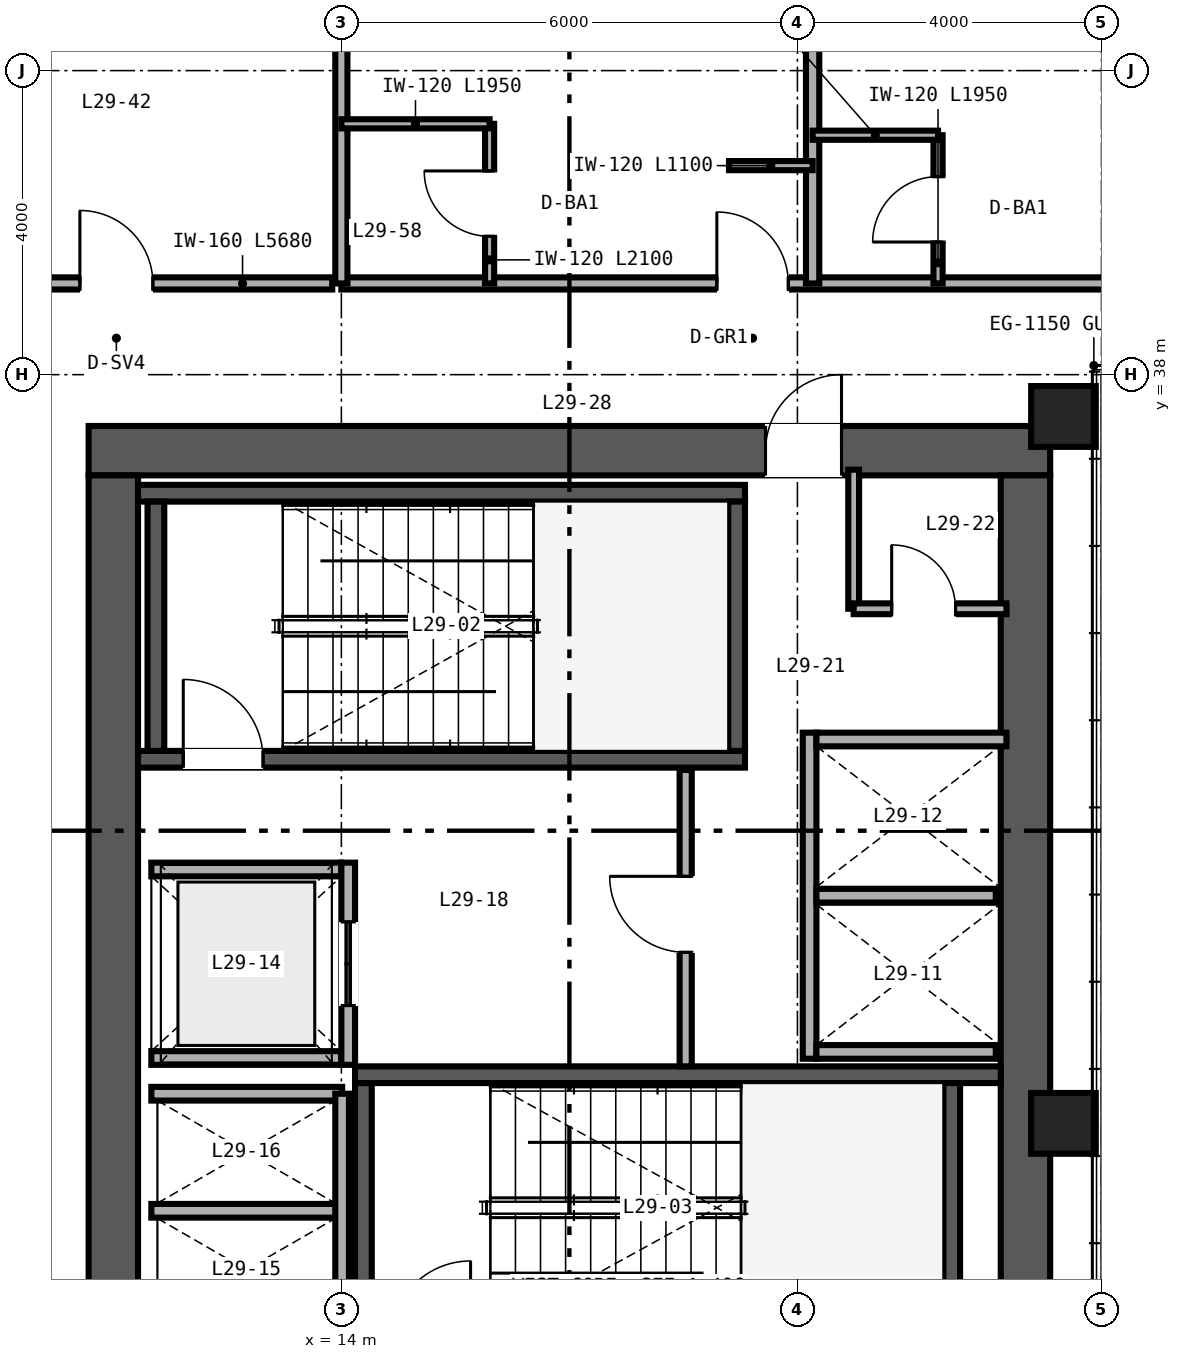
"""IFC4 building model, lengths in metres.
Left out: names, types, materials, properties, quantities, classifications, styles, units other than length and angle.
Written with IfcOpenShell. Run it as: python <this file> out.ifc"""

import sys

from ifc_helpers import new_model, si_unit, direction, frame, frame_2d, origin, origin_2d, place, context, subcontext, project, spatial, rectangle, hollow_rectangle, extrude, source, transform, mapped, element, fill, save


model = new_model("IFC4")
c1 = context("Model", 3, precision=1e-05, world=origin(), true_north=direction((0.0, 1.0)))
c2 = subcontext(c1, "Body", "Model", "MODEL_VIEW")
j1 = project(units=[si_unit("LENGTHUNIT", "METRE"), si_unit("PLANEANGLEUNIT", "RADIAN")], contexts=[c1])
p1 = place(None, origin())
s1 = spatial("IfcSite", under=j1, at=p1, CompositionType="ELEMENT")
p2 = place(p1, origin())
s2 = spatial("IfcBuilding", under=s1, at=p2, CompositionType="ELEMENT")
p3 = place(p2, frame((0.0, 0.0, 118.8)))
s3 = spatial("IfcBuildingStorey", under=s2, at=p3, CompositionType="ELEMENT", Elevation=118.8)
p4 = place(p3, frame((10.675, 37.0, 0.0), z_axis=(0.0, 0.0, 1.0), x_axis=(1.0, 0.0, 0.0)))
e1 = element("IfcWall", 1, at=p4, inside=s3, PredefinedType="SHEAR", context=c2, shape_type="SweptSolid", body=[
    extrude(rectangle(XDim=12.65, YDim=0.65, at=frame_2d((6.325, 0.0))), origin(), (0.0, 0.0, 1.0), 3.36),
])
p5 = place(p4, frame((8.905, 0.0, 0.0)))
e2 = element("IfcOpeningElement", 2, at=p5, cuts=e1, PredefinedType="OPENING", context=c2, shape_type="SweptSolid", body=[
    extrude(rectangle(XDim=1.0, YDim=2.15, at=frame_2d((0.5, 1.075))), frame((0.0, 0.335, 0.0), z_axis=(0.0, -1.0, 0.0), x_axis=(1.0, 0.0, 0.0)), (0.0, 0.0, 1.0), 0.67),
])
for number, where, z_axis, x_axis in (
    (3, (11.0, 15.325, 0.0), (0.0, 0.0, 1.0), (0.0, 1.0, 0.0)),
    (4, (23.0, 15.325, 0.0), (0.0, 0.0, 1.0), (0.0, 1.0, 0.0)),
):
    element("IfcWall", number, at=place(p3, frame(where, z_axis=z_axis, x_axis=x_axis)), inside=s3, PredefinedType="SHEAR", context=c2, shape_type="SweptSolid", body=[
        extrude(rectangle(XDim=21.35, YDim=0.65, at=frame_2d((10.675, 0.0))), origin(), (0.0, 0.0, 1.0), 3.36),
    ])
p6 = place(p3, frame((11.325, 32.94, 0.0), z_axis=(0.0, 0.0, 1.0), x_axis=(1.0, 0.0, 0.0)))
e5 = element("IfcWall", 5, at=p6, inside=s3, PredefinedType="SHEAR", context=c2, shape_type="SweptSolid", body=[
    extrude(rectangle(XDim=7.985, YDim=0.22, at=frame_2d((3.993, 0.0))), origin(), (0.0, 0.0, 1.0), 3.4),
])
p7 = place(p6, frame((0.595, 0.0, 0.0)))
e6 = element("IfcOpeningElement", 6, at=p7, cuts=e5, PredefinedType="OPENING", context=c2, shape_type="SweptSolid", body=[
    extrude(rectangle(XDim=1.05, YDim=2.15, at=frame_2d((0.525, 1.075))), frame((0.0, 0.12, 0.0), z_axis=(0.0, -1.0, 0.0), x_axis=(1.0, 0.0, 0.0)), (0.0, 0.0, 1.0), 0.24),
])
p8 = place(p3, frame((11.325, 36.44, 0.0), z_axis=(0.0, 0.0, 1.0), x_axis=(1.0, 0.0, 0.0)))
e7 = element("IfcWall", 7, at=p8, inside=s3, PredefinedType="SHEAR", context=c2, shape_type="SweptSolid", body=[
    extrude(rectangle(XDim=7.985, YDim=0.22, at=frame_2d((3.993, 0.0))), origin(), (0.0, 0.0, 1.0), 3.4),
])
for number, where, z_axis, x_axis in (
    (8, (11.56, 33.05, 0.0), (0.0, 0.0, 1.0), (0.0, 1.0, 0.0)),
    (9, (19.2, 33.05, 0.0), (0.0, 0.0, 1.0), (0.0, 1.0, 0.0)),
):
    element("IfcWall", number, at=place(p3, frame(where, z_axis=z_axis, x_axis=x_axis)), inside=s3, PredefinedType="SHEAR", context=c2, shape_type="SweptSolid", body=[
        extrude(rectangle(XDim=3.28, YDim=0.22, at=frame_2d((1.64, 0.0))), origin(), (0.0, 0.0, 1.0), 3.4),
    ])
p9 = place(p3, frame((14.18, 28.79, 0.0), z_axis=(0.0, 0.0, 1.0), x_axis=(1.0, 0.0, 0.0)))
e10 = element("IfcWall", 10, at=p9, inside=s3, PredefinedType="SHEAR", context=c2, shape_type="SweptSolid", body=[
    extrude(rectangle(XDim=8.495, YDim=0.22, at=frame_2d((4.248, 0.0))), origin(), (0.0, 0.0, 1.0), 3.4),
])
for number, where, z_axis, x_axis in (
    (11, (14.29, 25.4, 0.0), (0.0, 0.0, 1.0), (0.0, 1.0, 0.0)),
    (12, (22.03, 25.4, 0.0), (0.0, 0.0, 1.0), (0.0, 1.0, 0.0)),
):
    element("IfcWall", number, at=place(p3, frame(where, z_axis=z_axis, x_axis=x_axis)), inside=s3, PredefinedType="SHEAR", context=c2, shape_type="SweptSolid", body=[
        extrude(rectangle(XDim=3.28, YDim=0.22, at=frame_2d((1.64, 0.0))), origin(), (0.0, 0.0, 1.0), 3.4),
    ])
m1 = source(origin(), c2, "Body", "SweptSolid", [
    extrude(hollow_rectangle(XDim=0.85, YDim=0.8, WallThickness=0.032, at=origin_2d()), origin(), (0.0, 0.0, 1.0), 3.36),
])
for number, where, z_axis, x_axis in (
    (13, (23.5, 28.15, 0.0), (0.0, 0.0, 1.0), (1.0, 0.0, 0.0)),
    (14, (23.5, 37.45, 0.0), (0.0, 0.0, 1.0), (1.0, 0.0, 0.0)),
):
    element("IfcColumn", number, at=place(p3, frame(where, z_axis=z_axis, x_axis=x_axis)), inside=s3, PredefinedType="COLUMN", context=c2, shape_type="MappedRepresentation", body=[
        mapped(m1, transform((0.0, 0.0, 0.0), scale=1.0)),
    ])
p10 = place(p3, frame((20.16, 29.0, 0.0), z_axis=(0.0, 0.0, 1.0), x_axis=(0.0, 1.0, 0.0)))
e15 = element("IfcWall", 15, at=p10, inside=s3, PredefinedType="SOLIDWALL", context=c2, shape_type="SweptSolid", body=[
    extrude(rectangle(XDim=4.29, YDim=0.18, at=frame_2d((2.145, 0.0))), origin(), (0.0, 0.0, 1.0), 3.36),
])
p11 = place(p3, frame((20.25, 29.09, 0.0), z_axis=(0.0, 0.0, 1.0), x_axis=(1.0, 0.0, 0.0)))
e16 = element("IfcWall", 16, at=p11, inside=s3, PredefinedType="SOLIDWALL", context=c2, shape_type="SweptSolid", body=[
    extrude(rectangle(XDim=2.36, YDim=0.18, at=frame_2d((1.18, 0.0))), origin(), (0.0, 0.0, 1.0), 3.36),
])
p12 = place(p3, frame((20.25, 33.2, 0.0), z_axis=(0.0, 0.0, 1.0), x_axis=(1.0, 0.0, 0.0)))
e17 = element("IfcWall", 17, at=p12, inside=s3, PredefinedType="SOLIDWALL", context=c2, shape_type="SweptSolid", body=[
    extrude(rectangle(XDim=2.5, YDim=0.18, at=frame_2d((1.25, 0.0))), origin(), (0.0, 0.0, 1.0), 3.36),
])
p13 = place(p3, frame((20.25, 31.145, 0.0), z_axis=(0.0, 0.0, 1.0), x_axis=(1.0, 0.0, 0.0)))
e18 = element("IfcWall", 18, at=p13, inside=s3, PredefinedType="SOLIDWALL", context=c2, shape_type="SweptSolid", body=[
    extrude(rectangle(XDim=2.36, YDim=0.18, at=frame_2d((1.18, 0.0))), origin(), (0.0, 0.0, 1.0), 3.36),
])
for number, where, z_axis, x_axis in (
    (19, (11.5, 29.01, 0.0), (0.0, 0.0, 1.0), (1.0, 0.0, 0.0)),
    (20, (11.5, 31.49, 0.0), (0.0, 0.0, 1.0), (1.0, 0.0, 0.0)),
):
    element("IfcWall", number, at=place(p3, frame(where, z_axis=z_axis, x_axis=x_axis)), inside=s3, PredefinedType="SOLIDWALL", context=c2, shape_type="SweptSolid", body=[
        extrude(rectangle(XDim=2.5, YDim=0.18, at=frame_2d((1.25, 0.0))), origin(), (0.0, 0.0, 1.0), 3.36),
    ])
p14 = place(p3, frame((14.09, 28.92, 0.0), z_axis=(0.0, 0.0, 1.0), x_axis=(0.0, 1.0, 0.0)))
e21 = element("IfcWall", 21, at=p14, inside=s3, PredefinedType="SOLIDWALL", context=c2, shape_type="SweptSolid", body=[
    extrude(rectangle(XDim=2.66, YDim=0.18, at=frame_2d((1.33, 0.0))), origin(), (0.0, 0.0, 1.0), 3.36),
])
p15 = place(p14, frame((0.78, 0.0, 0.0)))
e22 = element("IfcOpeningElement", 22, at=p15, cuts=e21, PredefinedType="OPENING", context=c2, shape_type="SweptSolid", body=[
    extrude(rectangle(XDim=1.1, YDim=2.2, at=frame_2d((0.55, 1.1))), frame((0.0, 0.1, 0.0), z_axis=(0.0, -1.0, 0.0), x_axis=(1.0, 0.0, 0.0)), (0.0, 0.0, 1.0), 0.2),
])
for number, where, z_axis, x_axis in (
    (23, (11.5, 27.0, 0.0), (0.0, 0.0, 1.0), (1.0, 0.0, 0.0)),
    (24, (11.5, 28.54, 0.0), (0.0, 0.0, 1.0), (1.0, 0.0, 0.0)),
):
    element("IfcWall", number, at=place(p3, frame(where, z_axis=z_axis, x_axis=x_axis)), inside=s3, PredefinedType="SOLIDWALL", context=c2, shape_type="SweptSolid", body=[
        extrude(rectangle(XDim=2.51, YDim=0.18, at=frame_2d((1.255, 0.0))), origin(), (0.0, 0.0, 1.0), 3.36),
    ])
p16 = place(p3, frame((14.01, 25.46, 0.0), z_axis=(0.0, 0.0, 1.0), x_axis=(0.0, 1.0, 0.0)))
e25 = element("IfcWall", 25, at=p16, inside=s3, PredefinedType="SOLIDWALL", context=c2, shape_type="SweptSolid", body=[
    extrude(rectangle(XDim=3.08, YDim=0.18, at=frame_2d((1.54, 0.0))), origin(), (0.0, 0.0, 1.0), 3.36),
])
p17 = place(p3, frame((18.53, 28.9, 0.0), z_axis=(0.0, 0.0, 1.0), x_axis=(0.0, 1.0, 0.0)))
e26 = element("IfcWall", 26, at=p17, inside=s3, PredefinedType="PARTITIONING", context=c2, shape_type="SweptSolid", body=[
    extrude(rectangle(XDim=3.9, YDim=0.16, at=frame_2d((1.95, 0.0))), origin(), (0.0, 0.0, 1.0), 3.36),
])
p18 = place(p17, frame((1.5, 0.0, 0.0)))
e27 = element("IfcOpeningElement", 27, at=p18, cuts=e26, PredefinedType="OPENING", context=c2, shape_type="SweptSolid", body=[
    extrude(rectangle(XDim=1.0, YDim=2.15, at=frame_2d((0.5, 1.075))), frame((0.0, 0.09, 0.0), z_axis=(0.0, -1.0, 0.0), x_axis=(1.0, 0.0, 0.0)), (0.0, 0.0, 1.0), 0.18),
])
p19 = place(p3, frame((20.74, 34.92, 0.0), z_axis=(0.0, 0.0, 1.0), x_axis=(0.0, 1.0, 0.0)))
e28 = element("IfcWall", 28, at=p19, inside=s3, PredefinedType="PARTITIONING", context=c2, shape_type="SweptSolid", body=[
    extrude(rectangle(XDim=1.83, YDim=0.142, at=frame_2d((0.915, 0.0))), origin(), (0.0, 0.0, 1.0), 3.36),
])
p20 = place(p3, frame((20.74, 34.92, 0.0), z_axis=(0.0, 0.0, 1.0), x_axis=(1.0, 0.0, 0.0)))
e29 = element("IfcWall", 29, at=p20, inside=s3, PredefinedType="PARTITIONING", context=c2, shape_type="SweptSolid", body=[
    extrude(rectangle(XDim=2.01, YDim=0.142, at=frame_2d((1.005, 0.0))), origin(), (0.0, 0.0, 1.0), 3.36),
])
p21 = place(p20, frame((0.5, 0.0, 0.0)))
e30 = element("IfcOpeningElement", 30, at=p21, cuts=e29, PredefinedType="OPENING", context=c2, shape_type="SweptSolid", body=[
    extrude(rectangle(XDim=0.84, YDim=2.1, at=frame_2d((0.42, 1.05))), frame((0.0, 0.081, 0.0), z_axis=(0.0, -1.0, 0.0), x_axis=(1.0, 0.0, 0.0)), (0.0, 0.0, 1.0), 0.162),
])
p22 = place(p3, frame((8.2, 39.2, 0.0), z_axis=(0.0, 0.0, 1.0), x_axis=(1.0, 0.0, 0.0)))
e31 = element("IfcWall", 31, at=p22, inside=s3, PredefinedType="PARTITIONING", context=c2, shape_type="SweptSolid", body=[
    extrude(rectangle(XDim=5.68, YDim=0.16, at=frame_2d((2.84, 0.0))), origin(), (0.0, 0.0, 1.0), 3.36),
])
p23 = place(p22, frame((2.36, 0.0, 0.0)))
e32 = element("IfcOpeningElement", 32, at=p23, cuts=e31, PredefinedType="OPENING", context=c2, shape_type="SweptSolid", body=[
    extrude(rectangle(XDim=0.96, YDim=2.15, at=frame_2d((0.48, 1.075))), frame((0.0, 0.09, 0.0), z_axis=(0.0, -1.0, 0.0), x_axis=(1.0, 0.0, 0.0)), (0.0, 0.0, 1.0), 0.18),
])
p24 = place(p3, frame((14.0, 39.2, 0.0), z_axis=(0.0, 0.0, 1.0), x_axis=(1.0, 0.0, 0.0)))
e33 = element("IfcWall", 33, at=p24, inside=s3, PredefinedType="PARTITIONING", context=c2, shape_type="SweptSolid", body=[
    extrude(rectangle(XDim=36.0, YDim=0.16, at=frame_2d((18.0, 0.0))), origin(), (0.0, 0.0, 1.0), 2.581),
])
p25 = place(p24, frame((4.94, 0.0, 0.0)))
e34 = element("IfcOpeningElement", 34, at=p25, cuts=e33, PredefinedType="OPENING", context=c2, shape_type="SweptSolid", body=[
    extrude(rectangle(XDim=0.94, YDim=2.15, at=frame_2d((0.47, 1.075))), frame((0.0, 0.09, 0.0), z_axis=(0.0, -1.0, 0.0), x_axis=(1.0, 0.0, 0.0)), (0.0, 0.0, 1.0), 0.18),
])
p26 = place(p24, frame((11.14, 0.0, 0.0)))
e35 = element("IfcOpeningElement", 35, at=p26, cuts=e33, PredefinedType="OPENING", context=c2, shape_type="SweptSolid", body=[
    extrude(rectangle(XDim=0.94, YDim=2.15, at=frame_2d((0.47, 1.075))), frame((0.0, 0.09, 0.0), z_axis=(0.0, -1.0, 0.0), x_axis=(1.0, 0.0, 0.0)), (0.0, 0.0, 1.0), 0.18),
])
p27 = place(p24, frame((15.12, 0.0, 0.0)))
e36 = element("IfcOpeningElement", 36, at=p27, cuts=e33, PredefinedType="OPENING", context=c2, shape_type="SweptSolid", body=[
    extrude(rectangle(XDim=0.96, YDim=2.15, at=frame_2d((0.48, 1.075))), frame((0.0, 0.09, 0.0), z_axis=(0.0, -1.0, 0.0), x_axis=(1.0, 0.0, 0.0)), (0.0, 0.0, 1.0), 0.18),
])
p28 = place(p24, frame((21.42, 0.0, 0.0)))
e37 = element("IfcOpeningElement", 37, at=p28, cuts=e33, PredefinedType="OPENING", context=c2, shape_type="SweptSolid", body=[
    extrude(rectangle(XDim=0.96, YDim=2.15, at=frame_2d((0.48, 1.075))), frame((0.0, 0.09, 0.0), z_axis=(0.0, -1.0, 0.0), x_axis=(1.0, 0.0, 0.0)), (0.0, 0.0, 1.0), 0.18),
])
p29 = place(p24, frame((29.34, 0.0, 0.0)))
e38 = element("IfcOpeningElement", 38, at=p29, cuts=e33, PredefinedType="OPENING", context=c2, shape_type="SweptSolid", body=[
    extrude(rectangle(XDim=0.94, YDim=2.15, at=frame_2d((0.47, 1.075))), frame((0.0, 0.09, 0.0), z_axis=(0.0, -1.0, 0.0), x_axis=(1.0, 0.0, 0.0)), (0.0, 0.0, 1.0), 0.18),
])
p30 = place(p24, frame((34.74, 0.0, 0.0)))
e39 = element("IfcOpeningElement", 39, at=p30, cuts=e33, PredefinedType="OPENING", context=c2, shape_type="SweptSolid", body=[
    extrude(rectangle(XDim=0.94, YDim=2.15, at=frame_2d((0.47, 1.075))), frame((0.0, 0.09, 0.0), z_axis=(0.0, -1.0, 0.0), x_axis=(1.0, 0.0, 0.0)), (0.0, 0.0, 1.0), 0.18),
])
p31 = place(p3, frame((14.0, 39.2, 0.0), z_axis=(0.0, 0.0, 1.0), x_axis=(0.0, 1.0, 0.0)))
e40 = element("IfcWall", 40, at=p31, inside=s3, PredefinedType="PARTITIONING", context=c2, shape_type="SweptSolid", body=[
    extrude(rectangle(XDim=10.44, YDim=0.16, at=frame_2d((5.22, 0.0))), origin(), (0.0, 0.0, 1.0), 2.667),
])
p32 = place(p3, frame((20.2, 39.2, 0.0), z_axis=(0.0, 0.0, 1.0), x_axis=(0.0, 1.0, 0.0)))
e41 = element("IfcWall", 41, at=p32, inside=s3, PredefinedType="PARTITIONING", context=c2, shape_type="SweptSolid", body=[
    extrude(rectangle(XDim=10.44, YDim=0.175, at=frame_2d((5.22, 0.0))), origin(), (0.0, 0.0, 1.0), 2.667),
])
p33 = place(p3, frame((15.95, 39.2, 0.0), z_axis=(0.0, 0.0, 1.0), x_axis=(0.0, 1.0, 0.0)))
e42 = element("IfcWall", 42, at=p33, inside=s3, PredefinedType="PARTITIONING", context=c2, shape_type="SweptSolid", body=[
    extrude(rectangle(XDim=2.1, YDim=0.12, at=frame_2d((1.05, 0.0))), origin(), (0.0, 0.0, 1.0), 3.36),
])
p34 = place(p33, frame((0.62, 0.0, 0.0)))
e43 = element("IfcOpeningElement", 43, at=p34, cuts=e42, PredefinedType="OPENING", context=c2, shape_type="SweptSolid", body=[
    extrude(rectangle(XDim=0.86, YDim=2.1, at=frame_2d((0.43, 1.05))), frame((0.0, 0.07, 0.0), z_axis=(0.0, -1.0, 0.0), x_axis=(1.0, 0.0, 0.0)), (0.0, 0.0, 1.0), 0.14),
])
p35 = place(p3, frame((14.0, 41.3, 0.0), z_axis=(0.0, 0.0, 1.0), x_axis=(1.0, 0.0, 0.0)))
e44 = element("IfcWall", 44, at=p35, inside=s3, PredefinedType="PARTITIONING", context=c2, shape_type="SweptSolid", body=[
    extrude(rectangle(XDim=1.95, YDim=0.12, at=frame_2d((0.975, 0.0))), origin(), (0.0, 0.0, 1.0), 3.36),
])
p36 = place(p3, frame((19.1, 40.75, 0.0), z_axis=(0.0, 0.0, 1.0), x_axis=(1.0, 0.0, 0.0)))
e45 = element("IfcWall", 45, at=p36, inside=s3, PredefinedType="PARTITIONING", context=c2, shape_type="SweptSolid", body=[
    extrude(rectangle(XDim=1.1, YDim=0.12, at=frame_2d((0.55, 0.0))), origin(), (0.0, 0.0, 1.0), 3.36),
])
p37 = place(p3, frame((21.85, 39.2, 0.0), z_axis=(0.0, 0.0, 1.0), x_axis=(0.0, 1.0, 0.0)))
e46 = element("IfcWall", 46, at=p37, inside=s3, PredefinedType="PARTITIONING", context=c2, shape_type="SweptSolid", body=[
    extrude(rectangle(XDim=1.95, YDim=0.12, at=frame_2d((0.975, 0.0))), origin(), (0.0, 0.0, 1.0), 3.36),
])
p38 = place(p37, frame((0.545, 0.0, 0.0)))
e47 = element("IfcOpeningElement", 47, at=p38, cuts=e46, PredefinedType="OPENING", context=c2, shape_type="SweptSolid", body=[
    extrude(rectangle(XDim=0.86, YDim=2.1, at=frame_2d((0.43, 1.05))), frame((0.0, 0.07, 0.0), z_axis=(0.0, -1.0, 0.0), x_axis=(1.0, 0.0, 0.0)), (0.0, 0.0, 1.0), 0.14),
])
p39 = place(p3, frame((20.2, 41.15, 0.0), z_axis=(0.0, 0.0, 1.0), x_axis=(1.0, 0.0, 0.0)))
e48 = element("IfcWall", 48, at=p39, inside=s3, PredefinedType="PARTITIONING", context=c2, shape_type="SweptSolid", body=[
    extrude(rectangle(XDim=1.65, YDim=0.12, at=frame_2d((0.825, 0.0))), origin(), (0.0, 0.0, 1.0), 3.36),
])
m2 = source(origin(), c2, "Body", "SweptSolid", [
    extrude(rectangle(XDim=1.05, YDim=2.15, at=frame_2d((0.525, 1.075))), frame((0.0, 0.025, 0.0), z_axis=(0.0, -1.0, 0.0), x_axis=(1.0, 0.0, 0.0)), (0.0, 0.0, 1.0), 0.05),
])
p40 = place(p7, origin())
e49 = element("IfcDoor", 49, at=p40, inside=s3, OperationType="SINGLE_SWING_LEFT", PredefinedType="DOOR", context=c2, shape_type="MappedRepresentation", body=[
    mapped(m2, transform((0.0, 0.0, 0.0), scale=1.0)),
])
fill(e6, e49)
m3 = source(origin(), c2, "Body", "SweptSolid", [
    extrude(rectangle(XDim=1.1, YDim=2.2, at=frame_2d((0.55, 1.1))), frame((0.0, 0.025, 0.0), z_axis=(0.0, -1.0, 0.0), x_axis=(1.0, 0.0, 0.0)), (0.0, 0.0, 1.0), 0.05),
])
p41 = place(p15, origin())
e50 = element("IfcDoor", 50, at=p41, inside=s3, OperationType="DOUBLE_DOOR_SLIDING", PredefinedType="DOOR", context=c2, shape_type="MappedRepresentation", body=[
    mapped(m3, transform((0.0, 0.0, 0.0), scale=1.0)),
])
fill(e22, e50)
m4 = source(origin(), c2, "Body", "SweptSolid", [
    extrude(rectangle(XDim=1.0, YDim=2.15, at=frame_2d((0.5, 1.075))), frame((0.0, 0.025, 0.0), z_axis=(0.0, -1.0, 0.0), x_axis=(1.0, 0.0, 0.0)), (0.0, 0.0, 1.0), 0.05),
])
p42 = place(p18, origin())
e51 = element("IfcDoor", 51, at=p42, inside=s3, OperationType="SINGLE_SWING_RIGHT", PredefinedType="DOOR", context=c2, shape_type="MappedRepresentation", body=[
    mapped(m4, transform((0.0, 0.0, 0.0), scale=1.0)),
])
fill(e27, e51)
m5 = source(origin(), c2, "Body", "SweptSolid", [
    extrude(rectangle(XDim=0.84, YDim=2.1, at=frame_2d((0.42, 1.05))), frame((0.0, 0.025, 0.0), z_axis=(0.0, -1.0, 0.0), x_axis=(1.0, 0.0, 0.0)), (0.0, 0.0, 1.0), 0.05),
])
p43 = place(p21, origin())
e52 = element("IfcDoor", 52, at=p43, inside=s3, OperationType="SINGLE_SWING_LEFT", PredefinedType="DOOR", context=c2, shape_type="MappedRepresentation", body=[
    mapped(m5, transform((0.0, 0.0, 0.0), scale=1.0)),
])
fill(e30, e52)
p44 = place(p5, origin())
e53 = element("IfcDoor", 53, at=p44, inside=s3, OperationType="SINGLE_SWING_RIGHT", PredefinedType="DOOR", context=c2, shape_type="MappedRepresentation", body=[
    mapped(m4, transform((0.0, 0.0, 0.0), scale=1.0)),
])
fill(e2, e53)
m6 = source(origin(), c2, "Body", "SweptSolid", [
    extrude(rectangle(XDim=0.96, YDim=2.15, at=frame_2d((0.48, 1.075))), frame((0.0, 0.025, 0.0), z_axis=(0.0, -1.0, 0.0), x_axis=(1.0, 0.0, 0.0)), (0.0, 0.0, 1.0), 0.05),
])
p45 = place(p23, origin())
e54 = element("IfcDoor", 54, at=p45, inside=s3, OperationType="SINGLE_SWING_LEFT", PredefinedType="DOOR", context=c2, shape_type="MappedRepresentation", body=[
    mapped(m6, transform((0.0, 0.0, 0.0), scale=1.0)),
])
fill(e32, e54)
m7 = source(origin(), c2, "Body", "SweptSolid", [
    extrude(rectangle(XDim=0.86, YDim=2.1, at=frame_2d((0.43, 1.05))), frame((0.0, 0.025, 0.0), z_axis=(0.0, -1.0, 0.0), x_axis=(1.0, 0.0, 0.0)), (0.0, 0.0, 1.0), 0.05),
])
p46 = place(p34, origin())
e55 = element("IfcDoor", 55, at=p46, inside=s3, OperationType="SINGLE_SWING_RIGHT", PredefinedType="DOOR", context=c2, shape_type="MappedRepresentation", body=[
    mapped(m7, transform((0.0, 0.0, 0.0), scale=1.0)),
])
fill(e43, e55)
p47 = place(p38, origin())
e56 = element("IfcDoor", 56, at=p47, inside=s3, OperationType="SINGLE_SWING_LEFT", PredefinedType="DOOR", context=c2, shape_type="MappedRepresentation", body=[
    mapped(m7, transform((0.0, 0.0, 0.0), scale=1.0)),
])
fill(e47, e56)
m8 = source(origin(), c2, "Body", "SweptSolid", [
    extrude(rectangle(XDim=0.94, YDim=2.15, at=frame_2d((0.47, 1.075))), frame((0.0, 0.025, 0.0), z_axis=(0.0, -1.0, 0.0), x_axis=(1.0, 0.0, 0.0)), (0.0, 0.0, 1.0), 0.05),
])
p48 = place(p25, origin())
e57 = element("IfcDoor", 57, at=p48, inside=s3, OperationType="SINGLE_SWING_LEFT", PredefinedType="DOOR", context=c2, shape_type="MappedRepresentation", body=[
    mapped(m8, transform((0.0, 0.0, 0.0), scale=1.0)),
])
fill(e34, e57)
save(model, sys.argv[1])
